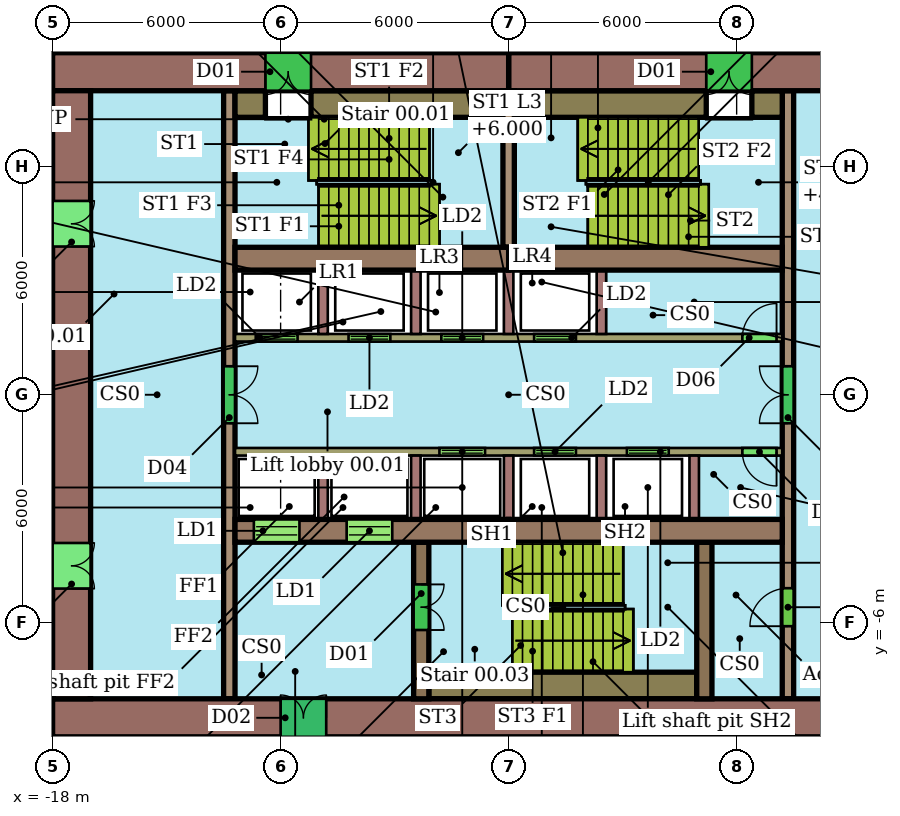
"""IFC4 building model, lengths in metres.
Left out: names, types, materials, properties, quantities, classifications, styles, units other than length and angle.
Written with IfcOpenShell. Run it as: python <this file> out.ifc"""

import sys

from ifc_helpers import new_model, si_unit, direction, frame, frame_2d, origin, place, context, subcontext, project, spatial, rectangle, extrude, element, fill, save


model = new_model("IFC4")
c1 = context("Model", 3, precision=1e-05, world=origin(), true_north=direction((0.0, 1.0)))
c2 = subcontext(c1, "Body", "Model", "MODEL_VIEW")
j1 = project(units=[si_unit("LENGTHUNIT", "METRE"), si_unit("PLANEANGLEUNIT", "RADIAN")], contexts=[c1])
p1 = place(None, origin())
s1 = spatial("IfcSite", under=j1, at=p1, CompositionType="ELEMENT")
p2 = place(p1, origin())
s2 = spatial("IfcBuilding", under=s1, at=p2, CompositionType="ELEMENT")
p3 = place(p2, origin())
s3 = spatial("IfcBuildingStorey", under=s2, at=p3, CompositionType="ELEMENT", Elevation=0.0)
p4 = place(p3, frame((6.0, 8.5, -2.0), z_axis=(0.0, 0.0, 1.0), x_axis=(-1.0, 0.0, 0.0)))
e1 = element("IfcWall", 1, at=p4, inside=s3, PredefinedType="SHEAR", context=c2, shape_type="SweptSolid", body=[
    extrude(rectangle(XDim=12.0, YDim=1.0, at=frame_2d((6.0, 0.0))), origin(), (0.0, 0.0, 1.0), 9.7),
])
p5 = place(p4, frame((5.6, 0.0, 2.0)))
e2 = element("IfcOpeningElement", 2, at=p5, cuts=e1, PredefinedType="OPENING", context=c2, shape_type="SweptSolid", body=[
    extrude(rectangle(XDim=1.2, YDim=2.1, at=frame_2d((0.6, 1.05))), frame((0.0, 0.51, 0.0), z_axis=(0.0, -1.0, 0.0), x_axis=(1.0, 0.0, 0.0)), (0.0, 0.0, 1.0), 1.02),
])
p6 = place(p3, frame((-6.0, 8.5, -2.0), z_axis=(0.0, 0.0, 1.0), x_axis=(-1.0, 0.0, 0.0)))
e3 = element("IfcWall", 3, at=p6, inside=s3, PredefinedType="SHEAR", context=c2, shape_type="SweptSolid", body=[
    extrude(rectangle(XDim=12.0, YDim=1.0, at=frame_2d((6.0, 0.0))), origin(), (0.0, 0.0, 1.0), 9.7),
])
p7 = place(p6, frame((5.2, 0.0, 2.0)))
e4 = element("IfcOpeningElement", 4, at=p7, cuts=e3, PredefinedType="OPENING", context=c2, shape_type="SweptSolid", body=[
    extrude(rectangle(XDim=1.2, YDim=2.1, at=frame_2d((0.6, 1.05))), frame((0.0, 0.51, 0.0), z_axis=(0.0, -1.0, 0.0), x_axis=(1.0, 0.0, 0.0)), (0.0, 0.0, 1.0), 1.02),
])
p8 = place(p3, frame((-18.0, -8.5, -2.0), z_axis=(0.0, 0.0, 1.0), x_axis=(1.0, 0.0, 0.0)))
e5 = element("IfcWall", 5, at=p8, inside=s3, PredefinedType="SHEAR", context=c2, shape_type="SweptSolid", body=[
    extrude(rectangle(XDim=24.0, YDim=1.0, at=frame_2d((12.0, 0.0))), origin(), (0.0, 0.0, 1.0), 9.7),
])
p9 = place(p8, frame((6.0, 0.0, 2.0)))
e6 = element("IfcOpeningElement", 6, at=p9, cuts=e5, PredefinedType="OPENING", context=c2, shape_type="SweptSolid", body=[
    extrude(rectangle(XDim=1.2, YDim=2.1, at=frame_2d((0.6, 1.05))), frame((0.0, 0.51, 0.0), z_axis=(0.0, -1.0, 0.0), x_axis=(1.0, 0.0, 0.0)), (0.0, 0.0, 1.0), 1.02),
])
p10 = place(p3, frame((-17.5, 8.0, -2.0), z_axis=(0.0, 0.0, 1.0), x_axis=(0.0, -1.0, 0.0)))
e7 = element("IfcWall", 7, at=p10, inside=s3, PredefinedType="SHEAR", context=c2, shape_type="SweptSolid", body=[
    extrude(rectangle(XDim=16.0, YDim=1.0, at=frame_2d((8.0, 0.0))), origin(), (0.0, 0.0, 1.0), 9.7),
])
p11 = place(p10, frame((11.9, 0.0, 2.0)))
e8 = element("IfcOpeningElement", 8, at=p11, cuts=e7, PredefinedType="OPENING", context=c2, shape_type="SweptSolid", body=[
    extrude(rectangle(XDim=1.2, YDim=2.1, at=frame_2d((0.6, 1.05))), frame((0.0, 0.51, 0.0), z_axis=(0.0, -1.0, 0.0), x_axis=(1.0, 0.0, 0.0)), (0.0, 0.0, 1.0), 1.02),
])
p12 = place(p10, frame((2.9, 0.0, 2.0)))
e9 = element("IfcOpeningElement", 9, at=p12, cuts=e7, PredefinedType="OPENING", context=c2, shape_type="SweptSolid", body=[
    extrude(rectangle(XDim=1.2, YDim=2.1, at=frame_2d((0.6, 1.05))), frame((0.0, 0.51, 0.0), z_axis=(0.0, -1.0, 0.0), x_axis=(1.0, 0.0, 0.0)), (0.0, 0.0, 1.0), 1.02),
])
for number, where, z_axis, x_axis in (
    (10, (-13.2, 3.58, -2.0), (0.0, 0.0, 1.0), (1.0, 0.0, 0.0)),
    (11, (-6.0, 3.58, -2.0), (0.0, 0.0, 1.0), (1.0, 0.0, 0.0)),
):
    element("IfcWall", number, at=place(p3, frame(where, z_axis=z_axis, x_axis=x_axis)), inside=s3, PredefinedType="SHEAR", context=c2, shape_type="SweptSolid", body=[
        extrude(rectangle(XDim=7.2, YDim=0.6, at=frame_2d((3.6, 0.0))), origin(), (0.0, 0.0, 1.0), 9.7),
    ])
p13 = place(p3, frame((-13.2, -3.58, -2.0), z_axis=(0.0, 0.0, 1.0), x_axis=(1.0, 0.0, 0.0)))
e12 = element("IfcWall", 12, at=p13, inside=s3, PredefinedType="SHEAR", context=c2, shape_type="SweptSolid", body=[
    extrude(rectangle(XDim=7.2, YDim=0.6, at=frame_2d((3.6, 0.0))), origin(), (0.0, 0.0, 1.0), 9.7),
])
p14 = place(p13, frame((0.496, 0.0, 2.0)))
e13 = element("IfcOpeningElement", 13, at=p14, cuts=e12, PredefinedType="OPENING", context=c2, shape_type="SweptSolid", body=[
    extrude(rectangle(XDim=1.2, YDim=2.1, at=frame_2d((0.6, 1.05))), frame((0.0, 0.31, 0.0), z_axis=(0.0, -1.0, 0.0), x_axis=(1.0, 0.0, 0.0)), (0.0, 0.0, 1.0), 0.62),
])
p15 = place(p13, frame((2.938, 0.0, 2.0)))
e14 = element("IfcOpeningElement", 14, at=p15, cuts=e12, PredefinedType="OPENING", context=c2, shape_type="SweptSolid", body=[
    extrude(rectangle(XDim=1.2, YDim=2.1, at=frame_2d((0.6, 1.05))), frame((0.0, 0.31, 0.0), z_axis=(0.0, -1.0, 0.0), x_axis=(1.0, 0.0, 0.0)), (0.0, 0.0, 1.0), 0.62),
])
p16 = place(p3, frame((-6.0, -3.58, -2.0), z_axis=(0.0, 0.0, 1.0), x_axis=(1.0, 0.0, 0.0)))
e15 = element("IfcWall", 15, at=p16, inside=s3, PredefinedType="SHEAR", context=c2, shape_type="SweptSolid", body=[
    extrude(rectangle(XDim=7.2, YDim=0.6, at=frame_2d((3.6, 0.0))), origin(), (0.0, 0.0, 1.0), 9.7),
])
p17 = place(p3, frame((-13.35, 8.0, -2.0), z_axis=(0.0, 0.0, 1.0), x_axis=(0.0, -1.0, 0.0)))
e16 = element("IfcWall", 16, at=p17, inside=s3, PredefinedType="SHEAR", context=c2, shape_type="SweptSolid", body=[
    extrude(rectangle(XDim=16.0, YDim=0.3, at=frame_2d((8.0, 0.0))), origin(), (0.0, 0.0, 1.0), 9.7),
])
p18 = place(p17, frame((7.25, 0.0, 2.0)))
e17 = element("IfcOpeningElement", 17, at=p18, cuts=e16, PredefinedType="OPENING", context=c2, shape_type="SweptSolid", body=[
    extrude(rectangle(XDim=1.5, YDim=2.1, at=frame_2d((0.75, 1.05))), frame((0.0, 0.16, 0.0), z_axis=(0.0, -1.0, 0.0), x_axis=(1.0, 0.0, 0.0)), (0.0, 0.0, 1.0), 0.32),
])
p19 = place(p3, frame((1.35, -8.0, -2.0), z_axis=(0.0, 0.0, 1.0), x_axis=(0.0, 1.0, 0.0)))
e18 = element("IfcWall", 18, at=p19, inside=s3, PredefinedType="SHEAR", context=c2, shape_type="SweptSolid", body=[
    extrude(rectangle(XDim=16.0, YDim=0.3, at=frame_2d((8.0, 0.0))), origin(), (0.0, 0.0, 1.0), 9.7),
])
p20 = place(p19, frame((1.91, 0.0, 2.0)))
e19 = element("IfcOpeningElement", 19, at=p20, cuts=e18, PredefinedType="OPENING", context=c2, shape_type="SweptSolid", body=[
    extrude(rectangle(XDim=1.0, YDim=2.1, at=frame_2d((0.5, 1.05))), frame((0.0, 0.16, 0.0), z_axis=(0.0, -1.0, 0.0), x_axis=(1.0, 0.0, 0.0)), (0.0, 0.0, 1.0), 0.32),
])
p21 = place(p19, frame((7.25, 0.0, 2.0)))
e20 = element("IfcOpeningElement", 20, at=p21, cuts=e18, PredefinedType="OPENING", context=c2, shape_type="SweptSolid", body=[
    extrude(rectangle(XDim=1.5, YDim=2.1, at=frame_2d((0.75, 1.05))), frame((0.0, 0.16, 0.0), z_axis=(0.0, -1.0, 0.0), x_axis=(1.0, 0.0, 0.0)), (0.0, 0.0, 1.0), 0.32),
])
p22 = place(p3, frame((-13.2, 1.5, -2.0), z_axis=(0.0, 0.0, 1.0), x_axis=(1.0, 0.0, 0.0)))
e21 = element("IfcWall", 21, at=p22, inside=s3, PredefinedType="SHEAR", context=c2, shape_type="SweptSolid", body=[
    extrude(rectangle(XDim=14.4, YDim=0.2, at=frame_2d((7.2, 0.0))), origin(), (0.0, 0.0, 1.0), 9.7),
])
p23 = place(p22, frame((0.546, 0.0, 2.0)))
e22 = element("IfcOpeningElement", 22, at=p23, cuts=e21, PredefinedType="OPENING", context=c2, shape_type="SweptSolid", body=[
    extrude(rectangle(XDim=1.1, YDim=2.1, at=frame_2d((0.55, 1.05))), frame((0.0, 0.11, 0.0), z_axis=(0.0, -1.0, 0.0), x_axis=(1.0, 0.0, 0.0)), (0.0, 0.0, 1.0), 0.22),
])
p24 = place(p22, frame((2.988, 0.0, 2.0)))
e23 = element("IfcOpeningElement", 23, at=p24, cuts=e21, PredefinedType="OPENING", context=c2, shape_type="SweptSolid", body=[
    extrude(rectangle(XDim=1.1, YDim=2.1, at=frame_2d((0.55, 1.05))), frame((0.0, 0.11, 0.0), z_axis=(0.0, -1.0, 0.0), x_axis=(1.0, 0.0, 0.0)), (0.0, 0.0, 1.0), 0.22),
])
p25 = place(p22, frame((5.429, 0.0, 2.0)))
e24 = element("IfcOpeningElement", 24, at=p25, cuts=e21, PredefinedType="OPENING", context=c2, shape_type="SweptSolid", body=[
    extrude(rectangle(XDim=1.1, YDim=2.1, at=frame_2d((0.55, 1.05))), frame((0.0, 0.11, 0.0), z_axis=(0.0, -1.0, 0.0), x_axis=(1.0, 0.0, 0.0)), (0.0, 0.0, 1.0), 0.22),
])
p26 = place(p22, frame((7.871, 0.0, 2.0)))
e25 = element("IfcOpeningElement", 25, at=p26, cuts=e21, PredefinedType="OPENING", context=c2, shape_type="SweptSolid", body=[
    extrude(rectangle(XDim=1.1, YDim=2.1, at=frame_2d((0.55, 1.05))), frame((0.0, 0.11, 0.0), z_axis=(0.0, -1.0, 0.0), x_axis=(1.0, 0.0, 0.0)), (0.0, 0.0, 1.0), 0.22),
])
p27 = place(p22, frame((13.35, 0.0, 2.0)))
e26 = element("IfcOpeningElement", 26, at=p27, cuts=e21, PredefinedType="OPENING", context=c2, shape_type="SweptSolid", body=[
    extrude(rectangle(XDim=0.9, YDim=2.1, at=frame_2d((0.45, 1.05))), frame((0.0, 0.11, 0.0), z_axis=(0.0, -1.0, 0.0), x_axis=(1.0, 0.0, 0.0)), (0.0, 0.0, 1.0), 0.22),
])
p28 = place(p3, frame((1.2, -1.5, -2.0), z_axis=(0.0, 0.0, 1.0), x_axis=(-1.0, 0.0, 0.0)))
e27 = element("IfcWall", 27, at=p28, inside=s3, PredefinedType="SHEAR", context=c2, shape_type="SweptSolid", body=[
    extrude(rectangle(XDim=14.4, YDim=0.2, at=frame_2d((7.2, 0.0))), origin(), (0.0, 0.0, 1.0), 9.7),
])
p29 = place(p28, frame((7.821, 0.0, 2.0)))
e28 = element("IfcOpeningElement", 28, at=p29, cuts=e27, PredefinedType="OPENING", context=c2, shape_type="SweptSolid", body=[
    extrude(rectangle(XDim=1.2, YDim=2.1, at=frame_2d((0.6, 1.05))), frame((0.0, 0.11, 0.0), z_axis=(0.0, -1.0, 0.0), x_axis=(1.0, 0.0, 0.0)), (0.0, 0.0, 1.0), 0.22),
])
p30 = place(p28, frame((5.429, 0.0, 2.0)))
e29 = element("IfcOpeningElement", 29, at=p30, cuts=e27, PredefinedType="OPENING", context=c2, shape_type="SweptSolid", body=[
    extrude(rectangle(XDim=1.1, YDim=2.1, at=frame_2d((0.55, 1.05))), frame((0.0, 0.11, 0.0), z_axis=(0.0, -1.0, 0.0), x_axis=(1.0, 0.0, 0.0)), (0.0, 0.0, 1.0), 0.22),
])
p31 = place(p28, frame((2.988, 0.0, 2.0)))
e30 = element("IfcOpeningElement", 30, at=p31, cuts=e27, PredefinedType="OPENING", context=c2, shape_type="SweptSolid", body=[
    extrude(rectangle(XDim=1.1, YDim=2.1, at=frame_2d((0.55, 1.05))), frame((0.0, 0.11, 0.0), z_axis=(0.0, -1.0, 0.0), x_axis=(1.0, 0.0, 0.0)), (0.0, 0.0, 1.0), 0.22),
])
p32 = place(p28, frame((0.15, 0.0, 2.0)))
e31 = element("IfcOpeningElement", 31, at=p32, cuts=e27, PredefinedType="OPENING", context=c2, shape_type="SweptSolid", body=[
    extrude(rectangle(XDim=0.9, YDim=2.1, at=frame_2d((0.45, 1.05))), frame((0.0, 0.11, 0.0), z_axis=(0.0, -1.0, 0.0), x_axis=(1.0, 0.0, 0.0)), (0.0, 0.0, 1.0), 0.22),
])
p33 = place(p3, frame((-8.3, -3.88, -2.0), z_axis=(0.0, 0.0, 1.0), x_axis=(0.0, -1.0, 0.0)))
e32 = element("IfcWall", 32, at=p33, inside=s3, PredefinedType="SHEAR", context=c2, shape_type="SweptSolid", body=[
    extrude(rectangle(XDim=4.12, YDim=0.4, at=frame_2d((2.06, 0.0))), origin(), (0.0, 0.0, 1.0), 9.7),
])
p34 = place(p33, frame((1.11, 0.0, 2.0)))
e33 = element("IfcOpeningElement", 33, at=p34, cuts=e32, PredefinedType="OPENING", context=c2, shape_type="SweptSolid", body=[
    extrude(rectangle(XDim=1.2, YDim=2.1, at=frame_2d((0.6, 1.05))), frame((0.0, 0.21, 0.0), z_axis=(0.0, -1.0, 0.0), x_axis=(1.0, 0.0, 0.0)), (0.0, 0.0, 1.0), 0.42),
])
p35 = place(p3, frame((-0.85, -3.88, -2.0), z_axis=(0.0, 0.0, 1.0), x_axis=(0.0, -1.0, 0.0)))
e34 = element("IfcWall", 34, at=p35, inside=s3, PredefinedType="SHEAR", context=c2, shape_type="SweptSolid", body=[
    extrude(rectangle(XDim=4.12, YDim=0.4, at=frame_2d((2.06, 0.0))), origin(), (0.0, 0.0, 1.0), 9.7),
])
p36 = place(p3, frame((-6.0, 3.88, -2.0), z_axis=(0.0, 0.0, 1.0), x_axis=(0.0, 1.0, 0.0)))
e35 = element("IfcWall", 35, at=p36, inside=s3, PredefinedType="SHEAR", context=c2, shape_type="SweptSolid", body=[
    extrude(rectangle(XDim=4.12, YDim=0.3, at=frame_2d((2.06, 0.0))), origin(), (0.0, 0.0, 1.0), 9.7),
])
p37 = place(p3, frame((-13.2, 7.65, -2.0), z_axis=(0.0, 0.0, 1.0), x_axis=(1.0, 0.0, 0.0)))
e36 = element("IfcWall", 36, at=p37, inside=s3, PredefinedType="SHEAR", context=c2, shape_type="SweptSolid", body=[
    extrude(rectangle(XDim=0.8, YDim=0.7, at=frame_2d((0.4, 0.0))), origin(), (0.0, 0.0, 1.0), 9.7),
])
for number, where, z_axis, x_axis in (
    (37, (-11.2, 7.65, -2.0), (0.0, 0.0, 1.0), (1.0, 0.0, 0.0)),
    (38, (-5.85, 7.65, -2.0), (0.0, 0.0, 1.0), (1.0, 0.0, 0.0)),
):
    element("IfcWall", number, at=place(p3, frame(where, z_axis=z_axis, x_axis=x_axis)), inside=s3, PredefinedType="SHEAR", context=c2, shape_type="SweptSolid", body=[
        extrude(rectangle(XDim=5.05, YDim=0.7, at=frame_2d((2.525, 0.0))), origin(), (0.0, 0.0, 1.0), 9.7),
    ])
p38 = place(p3, frame((0.4, 7.65, -2.0), z_axis=(0.0, 0.0, 1.0), x_axis=(1.0, 0.0, 0.0)))
e39 = element("IfcWall", 39, at=p38, inside=s3, PredefinedType="SHEAR", context=c2, shape_type="SweptSolid", body=[
    extrude(rectangle(XDim=0.8, YDim=0.7, at=frame_2d((0.4, 0.0))), origin(), (0.0, 0.0, 1.0), 9.7),
])
p39 = place(p3, frame((-8.1, -7.65, -2.0), z_axis=(0.0, 0.0, 1.0), x_axis=(1.0, 0.0, 0.0)))
e40 = element("IfcWall", 40, at=p39, inside=s3, PredefinedType="SHEAR", context=c2, shape_type="SweptSolid", body=[
    extrude(rectangle(XDim=7.05, YDim=0.7, at=frame_2d((3.525, 0.0))), origin(), (0.0, 0.0, 1.0), 9.7),
])
for number, where, z_axis, x_axis in (
    (41, (-10.883, 1.6, -2.0), (0.0, 0.0, 1.0), (0.0, 1.0, 0.0)),
    (42, (-8.442, 1.6, -2.0), (0.0, 0.0, 1.0), (0.0, 1.0, 0.0)),
    (43, (-6.0, 1.6, -2.0), (0.0, 0.0, 1.0), (0.0, 1.0, 0.0)),
    (44, (-3.558, 1.6, -2.0), (0.0, 0.0, 1.0), (0.0, 1.0, 0.0)),
    (45, (-10.883, -1.6, -2.0), (0.0, 0.0, 1.0), (0.0, -1.0, 0.0)),
    (46, (-8.442, -1.6, -2.0), (0.0, 0.0, 1.0), (0.0, -1.0, 0.0)),
    (47, (-6.0, -1.6, -2.0), (0.0, 0.0, 1.0), (0.0, -1.0, 0.0)),
    (48, (-3.558, -1.6, -2.0), (0.0, 0.0, 1.0), (0.0, -1.0, 0.0)),
    (49, (-1.117, -1.6, -2.0), (0.0, 0.0, 1.0), (0.0, -1.0, 0.0)),
):
    element("IfcWall", number, at=place(p3, frame(where, z_axis=z_axis, x_axis=x_axis)), inside=s3, PredefinedType="SHEAR", context=c2, shape_type="SweptSolid", body=[
        extrude(rectangle(XDim=1.68, YDim=0.25, at=frame_2d((0.84, 0.0))), origin(), (0.0, 0.0, 1.0), 9.7),
    ])
p40 = place(p5, origin())
e50 = element("IfcDoor", 50, at=p40, inside=s3, OperationType="DOUBLE_DOOR_SINGLE_SWING", PredefinedType="NOTDEFINED", context=c2, shape_type="SweptSolid", body=[
    extrude(rectangle(XDim=1.2, YDim=2.1, at=frame_2d((0.6, 1.05))), frame((0.0, 0.025, 0.0), z_axis=(0.0, -1.0, 0.0), x_axis=(1.0, 0.0, 0.0)), (0.0, 0.0, 1.0), 0.05),
])
fill(e2, e50)
p41 = place(p7, origin())
e51 = element("IfcDoor", 51, at=p41, inside=s3, OperationType="DOUBLE_DOOR_SINGLE_SWING", PredefinedType="NOTDEFINED", context=c2, shape_type="SweptSolid", body=[
    extrude(rectangle(XDim=1.2, YDim=2.1, at=frame_2d((0.6, 1.05))), frame((0.0, 0.025, 0.0), z_axis=(0.0, -1.0, 0.0), x_axis=(1.0, 0.0, 0.0)), (0.0, 0.0, 1.0), 0.05),
])
fill(e4, e51)
p42 = place(p9, origin())
e52 = element("IfcDoor", 52, at=p42, inside=s3, OperationType="DOUBLE_DOOR_SINGLE_SWING", PredefinedType="NOTDEFINED", context=c2, shape_type="SweptSolid", body=[
    extrude(rectangle(XDim=1.2, YDim=2.1, at=frame_2d((0.6, 1.05))), frame((0.0, 0.025, 0.0), z_axis=(0.0, -1.0, 0.0), x_axis=(1.0, 0.0, 0.0)), (0.0, 0.0, 1.0), 0.05),
])
fill(e6, e52)
p43 = place(p11, origin())
e53 = element("IfcDoor", 53, at=p43, inside=s3, OperationType="DOUBLE_DOOR_SINGLE_SWING", PredefinedType="NOTDEFINED", context=c2, shape_type="SweptSolid", body=[
    extrude(rectangle(XDim=1.2, YDim=2.1, at=frame_2d((0.6, 1.05))), frame((0.0, 0.025, 0.0), z_axis=(0.0, -1.0, 0.0), x_axis=(1.0, 0.0, 0.0)), (0.0, 0.0, 1.0), 0.05),
])
fill(e8, e53)
p44 = place(p12, origin())
e54 = element("IfcDoor", 54, at=p44, inside=s3, OperationType="DOUBLE_DOOR_SINGLE_SWING", PredefinedType="NOTDEFINED", context=c2, shape_type="SweptSolid", body=[
    extrude(rectangle(XDim=1.2, YDim=2.1, at=frame_2d((0.6, 1.05))), frame((0.0, 0.025, 0.0), z_axis=(0.0, -1.0, 0.0), x_axis=(1.0, 0.0, 0.0)), (0.0, 0.0, 1.0), 0.05),
])
fill(e9, e54)
p45 = place(p14, origin())
e55 = element("IfcDoor", 55, at=p45, inside=s3, OperationType="DOUBLE_DOOR_SLIDING", PredefinedType="NOTDEFINED", context=c2, shape_type="SweptSolid", body=[
    extrude(rectangle(XDim=1.2, YDim=2.1, at=frame_2d((0.6, 1.05))), frame((0.0, 0.025, 0.0), z_axis=(0.0, -1.0, 0.0), x_axis=(1.0, 0.0, 0.0)), (0.0, 0.0, 1.0), 0.05),
])
fill(e13, e55)
p46 = place(p15, origin())
e56 = element("IfcDoor", 56, at=p46, inside=s3, OperationType="DOUBLE_DOOR_SLIDING", PredefinedType="NOTDEFINED", context=c2, shape_type="SweptSolid", body=[
    extrude(rectangle(XDim=1.2, YDim=2.1, at=frame_2d((0.6, 1.05))), frame((0.0, 0.025, 0.0), z_axis=(0.0, -1.0, 0.0), x_axis=(1.0, 0.0, 0.0)), (0.0, 0.0, 1.0), 0.05),
])
fill(e14, e56)
p47 = place(p18, origin())
e57 = element("IfcDoor", 57, at=p47, inside=s3, OperationType="DOUBLE_DOOR_SINGLE_SWING", PredefinedType="NOTDEFINED", context=c2, shape_type="SweptSolid", body=[
    extrude(rectangle(XDim=1.5, YDim=2.1, at=frame_2d((0.75, 1.05))), frame((0.0, 0.025, 0.0), z_axis=(0.0, -1.0, 0.0), x_axis=(1.0, 0.0, 0.0)), (0.0, 0.0, 1.0), 0.05),
])
fill(e17, e57)
p48 = place(p20, origin())
e58 = element("IfcDoor", 58, at=p48, inside=s3, OperationType="SINGLE_SWING_LEFT", PredefinedType="NOTDEFINED", context=c2, shape_type="SweptSolid", body=[
    extrude(rectangle(XDim=1.0, YDim=2.1, at=frame_2d((0.5, 1.05))), frame((0.0, 0.025, 0.0), z_axis=(0.0, -1.0, 0.0), x_axis=(1.0, 0.0, 0.0)), (0.0, 0.0, 1.0), 0.05),
])
fill(e19, e58)
p49 = place(p21, origin())
e59 = element("IfcDoor", 59, at=p49, inside=s3, OperationType="DOUBLE_DOOR_SINGLE_SWING", PredefinedType="NOTDEFINED", context=c2, shape_type="SweptSolid", body=[
    extrude(rectangle(XDim=1.5, YDim=2.1, at=frame_2d((0.75, 1.05))), frame((0.0, 0.025, 0.0), z_axis=(0.0, -1.0, 0.0), x_axis=(1.0, 0.0, 0.0)), (0.0, 0.0, 1.0), 0.05),
])
fill(e20, e59)
p50 = place(p23, origin())
e60 = element("IfcDoor", 60, at=p50, inside=s3, OperationType="DOUBLE_DOOR_SLIDING", PredefinedType="NOTDEFINED", context=c2, shape_type="SweptSolid", body=[
    extrude(rectangle(XDim=1.1, YDim=2.1, at=frame_2d((0.55, 1.05))), frame((0.0, 0.025, 0.0), z_axis=(0.0, -1.0, 0.0), x_axis=(1.0, 0.0, 0.0)), (0.0, 0.0, 1.0), 0.05),
])
fill(e22, e60)
p51 = place(p24, origin())
e61 = element("IfcDoor", 61, at=p51, inside=s3, OperationType="DOUBLE_DOOR_SLIDING", PredefinedType="NOTDEFINED", context=c2, shape_type="SweptSolid", body=[
    extrude(rectangle(XDim=1.1, YDim=2.1, at=frame_2d((0.55, 1.05))), frame((0.0, 0.025, 0.0), z_axis=(0.0, -1.0, 0.0), x_axis=(1.0, 0.0, 0.0)), (0.0, 0.0, 1.0), 0.05),
])
fill(e23, e61)
p52 = place(p25, origin())
e62 = element("IfcDoor", 62, at=p52, inside=s3, OperationType="DOUBLE_DOOR_SLIDING", PredefinedType="NOTDEFINED", context=c2, shape_type="SweptSolid", body=[
    extrude(rectangle(XDim=1.1, YDim=2.1, at=frame_2d((0.55, 1.05))), frame((0.0, 0.025, 0.0), z_axis=(0.0, -1.0, 0.0), x_axis=(1.0, 0.0, 0.0)), (0.0, 0.0, 1.0), 0.05),
])
fill(e24, e62)
p53 = place(p26, origin())
e63 = element("IfcDoor", 63, at=p53, inside=s3, OperationType="DOUBLE_DOOR_SLIDING", PredefinedType="NOTDEFINED", context=c2, shape_type="SweptSolid", body=[
    extrude(rectangle(XDim=1.1, YDim=2.1, at=frame_2d((0.55, 1.05))), frame((0.0, 0.025, 0.0), z_axis=(0.0, -1.0, 0.0), x_axis=(1.0, 0.0, 0.0)), (0.0, 0.0, 1.0), 0.05),
])
fill(e25, e63)
p54 = place(p27, origin())
e64 = element("IfcDoor", 64, at=p54, inside=s3, OperationType="SINGLE_SWING_RIGHT", PredefinedType="NOTDEFINED", context=c2, shape_type="SweptSolid", body=[
    extrude(rectangle(XDim=0.9, YDim=2.1, at=frame_2d((0.45, 1.05))), frame((0.0, 0.025, 0.0), z_axis=(0.0, -1.0, 0.0), x_axis=(1.0, 0.0, 0.0)), (0.0, 0.0, 1.0), 0.05),
])
fill(e26, e64)
p55 = place(p29, origin())
e65 = element("IfcDoor", 65, at=p55, inside=s3, OperationType="DOUBLE_DOOR_SLIDING", PredefinedType="NOTDEFINED", context=c2, shape_type="SweptSolid", body=[
    extrude(rectangle(XDim=1.2, YDim=2.1, at=frame_2d((0.6, 1.05))), frame((0.0, 0.025, 0.0), z_axis=(0.0, -1.0, 0.0), x_axis=(1.0, 0.0, 0.0)), (0.0, 0.0, 1.0), 0.05),
])
fill(e28, e65)
p56 = place(p30, origin())
e66 = element("IfcDoor", 66, at=p56, inside=s3, OperationType="DOUBLE_DOOR_SLIDING", PredefinedType="NOTDEFINED", context=c2, shape_type="SweptSolid", body=[
    extrude(rectangle(XDim=1.1, YDim=2.1, at=frame_2d((0.55, 1.05))), frame((0.0, 0.025, 0.0), z_axis=(0.0, -1.0, 0.0), x_axis=(1.0, 0.0, 0.0)), (0.0, 0.0, 1.0), 0.05),
])
fill(e29, e66)
p57 = place(p31, origin())
e67 = element("IfcDoor", 67, at=p57, inside=s3, OperationType="DOUBLE_DOOR_SLIDING", PredefinedType="NOTDEFINED", context=c2, shape_type="SweptSolid", body=[
    extrude(rectangle(XDim=1.1, YDim=2.1, at=frame_2d((0.55, 1.05))), frame((0.0, 0.025, 0.0), z_axis=(0.0, -1.0, 0.0), x_axis=(1.0, 0.0, 0.0)), (0.0, 0.0, 1.0), 0.05),
])
fill(e30, e67)
p58 = place(p32, origin())
e68 = element("IfcDoor", 68, at=p58, inside=s3, OperationType="SINGLE_SWING_LEFT", PredefinedType="NOTDEFINED", context=c2, shape_type="SweptSolid", body=[
    extrude(rectangle(XDim=0.9, YDim=2.1, at=frame_2d((0.45, 1.05))), frame((0.0, 0.025, 0.0), z_axis=(0.0, -1.0, 0.0), x_axis=(1.0, 0.0, 0.0)), (0.0, 0.0, 1.0), 0.05),
])
fill(e31, e68)
p59 = place(p34, origin())
e69 = element("IfcDoor", 69, at=p59, inside=s3, OperationType="DOUBLE_DOOR_SINGLE_SWING", PredefinedType="NOTDEFINED", context=c2, shape_type="SweptSolid", body=[
    extrude(rectangle(XDim=1.2, YDim=2.1, at=frame_2d((0.6, 1.05))), frame((0.0, 0.025, 0.0), z_axis=(0.0, -1.0, 0.0), x_axis=(1.0, 0.0, 0.0)), (0.0, 0.0, 1.0), 0.05),
])
fill(e33, e69)
save(model, sys.argv[1])
